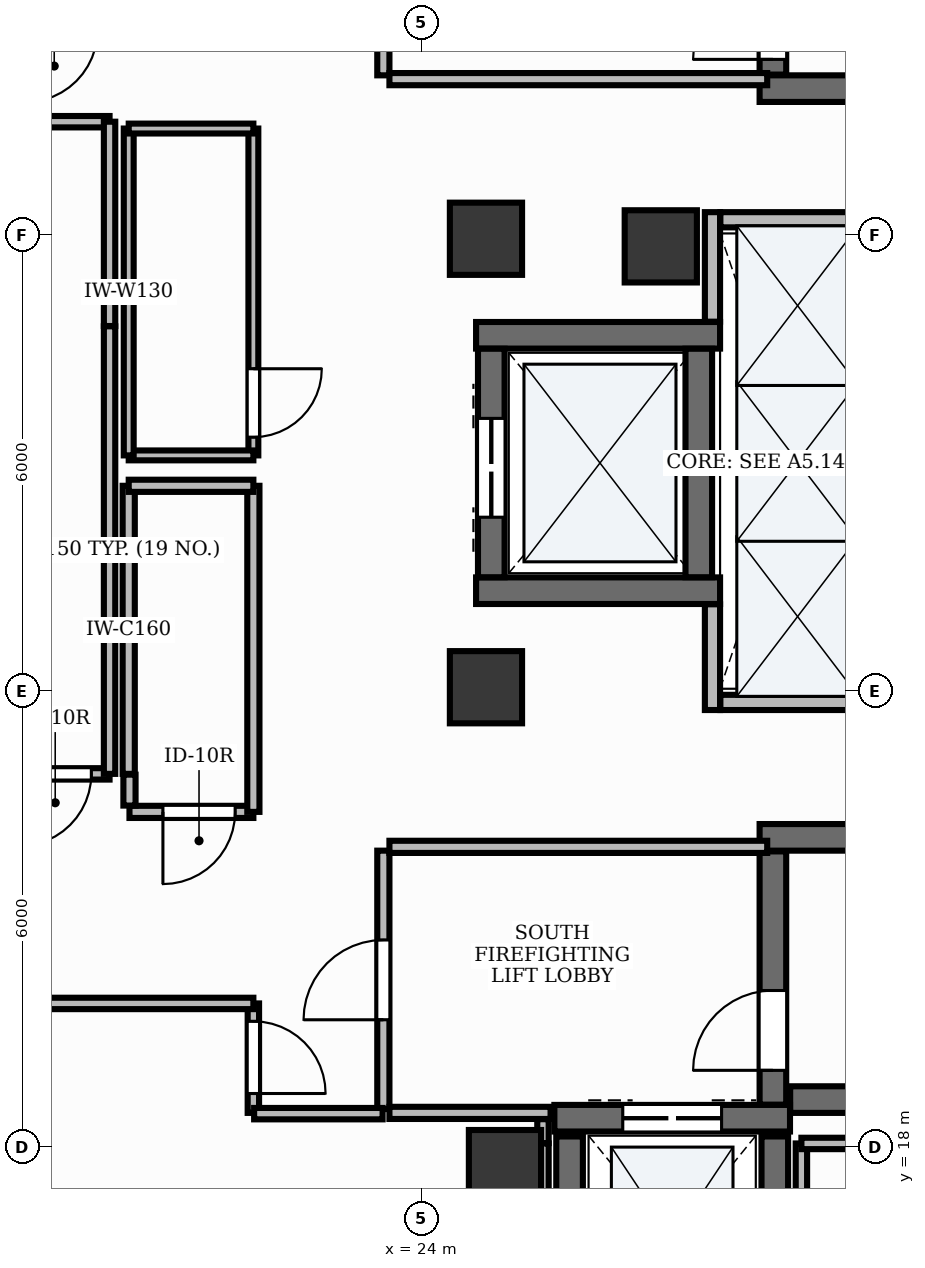
"""IFC4 building model, lengths in metres.
Left out: names, types, materials, properties, quantities, classifications, styles, units other than length and angle.
Written with IfcOpenShell. Run it as: python <this file> out.ifc"""

import sys

from ifc_helpers import new_model, si_unit, direction, frame, frame_2d, origin, origin_2d, place, context, subcontext, project, spatial, rectangle, extrude, element, fill, save


model = new_model("IFC4")
c1 = context("Model", 3, precision=1e-05, world=origin(), true_north=direction((0.0, 1.0)))
c2 = subcontext(c1, "Body", "Model", "MODEL_VIEW")
j1 = project(units=[si_unit("LENGTHUNIT", "METRE"), si_unit("PLANEANGLEUNIT", "RADIAN")], contexts=[c1])
p1 = place(None, origin())
s1 = spatial("IfcSite", under=j1, at=p1, CompositionType="ELEMENT")
p2 = place(p1, origin())
s2 = spatial("IfcBuilding", under=s1, at=p2, CompositionType="ELEMENT")
p3 = place(p2, frame((0.0, 0.0, 322.8)))
s3 = spatial("IfcBuildingStorey", under=s2, at=p3, CompositionType="ELEMENT", Elevation=322.8)
p4 = place(p3, frame((28.45, 31.925, 0.0), z_axis=(0.0, 0.0, 1.0), x_axis=(1.0, 0.0, 0.0)))
e1 = element("IfcWall", 1, at=p4, inside=s3, PredefinedType="SHEAR", context=c2, shape_type="SweptSolid", body=[
    extrude(rectangle(XDim=8.55, YDim=0.35, at=frame_2d((4.275, 0.0))), origin(), (0.0, 0.0, 1.0), 3.9),
])
p5 = place(p3, frame((28.625, 32.11, 0.0), z_axis=(0.0, 0.0, 1.0), x_axis=(0.0, 1.0, 0.0)))
e2 = element("IfcWall", 2, at=p5, inside=s3, PredefinedType="SHEAR", context=c2, shape_type="SweptSolid", body=[
    extrude(rectangle(XDim=3.333, YDim=0.35, at=frame_2d((1.667, 0.0))), origin(), (0.0, 0.0, 1.0), 3.9),
])
p6 = place(p5, frame((0.2, 0.0, 0.0)))
e3 = element("IfcOpeningElement", 3, at=p6, cuts=e2, PredefinedType="OPENING", context=c2, shape_type="SweptSolid", body=[
    extrude(rectangle(XDim=1.05, YDim=2.15, at=frame_2d((0.525, 1.075))), frame((0.0, 0.19, 0.0), z_axis=(0.0, -1.0, 0.0), x_axis=(1.0, 0.0, 0.0)), (0.0, 0.0, 1.0), 0.38),
])
p7 = place(p3, frame((28.852, 18.625, 0.0), z_axis=(0.0, 0.0, 1.0), x_axis=(1.0, 0.0, 0.0)))
e4 = element("IfcWall", 4, at=p7, inside=s3, PredefinedType="SHEAR", context=c2, shape_type="SweptSolid", body=[
    extrude(rectangle(XDim=8.148, YDim=0.35, at=frame_2d((4.074, 0.0))), origin(), (0.0, 0.0, 1.0), 3.9),
])
p8 = place(p3, frame((28.45, 22.075, 0.0), z_axis=(0.0, 0.0, 1.0), x_axis=(1.0, 0.0, 0.0)))
e5 = element("IfcWall", 5, at=p8, inside=s3, PredefinedType="SHEAR", context=c2, shape_type="SweptSolid", body=[
    extrude(rectangle(XDim=8.55, YDim=0.35, at=frame_2d((4.275, 0.0))), origin(), (0.0, 0.0, 1.0), 3.9),
])
p9 = place(p3, frame((28.625, 18.557, 0.0), z_axis=(0.0, 0.0, 1.0), x_axis=(0.0, 1.0, 0.0)))
e6 = element("IfcWall", 6, at=p9, inside=s3, PredefinedType="SHEAR", context=c2, shape_type="SweptSolid", body=[
    extrude(rectangle(XDim=3.333, YDim=0.35, at=frame_2d((1.667, 0.0))), origin(), (0.0, 0.0, 1.0), 3.9),
])
p10 = place(p9, frame((0.453, 0.0, 0.0)))
e7 = element("IfcOpeningElement", 7, at=p10, cuts=e6, PredefinedType="OPENING", context=c2, shape_type="SweptSolid", body=[
    extrude(rectangle(XDim=1.05, YDim=2.15, at=frame_2d((0.525, 1.075))), frame((0.0, 0.19, 0.0), z_axis=(0.0, -1.0, 0.0), x_axis=(1.0, 0.0, 0.0)), (0.0, 0.0, 1.0), 0.38),
])
p11 = place(p3, frame((25.75, 18.38, 0.0), z_axis=(0.0, 0.0, 1.0), x_axis=(1.0, 0.0, 0.0)))
e8 = element("IfcWall", 8, at=p11, inside=s3, PredefinedType="SHEAR", context=c2, shape_type="SweptSolid", body=[
    extrude(rectangle(XDim=3.1, YDim=0.35, at=frame_2d((1.55, 0.0))), origin(), (0.0, 0.0, 1.0), 3.9),
])
p12 = place(p11, frame((0.9, 0.0, 0.0)))
e9 = element("IfcOpeningElement", 9, at=p12, cuts=e8, PredefinedType="OPENING", context=c2, shape_type="SweptSolid", body=[
    extrude(rectangle(XDim=1.3, YDim=2.2, at=frame_2d((0.65, 1.1))), frame((0.0, 0.19, 0.0), z_axis=(0.0, -1.0, 0.0), x_axis=(1.0, 0.0, 0.0)), (0.0, 0.0, 1.0), 0.38),
])
for number, where, z_axis, x_axis in (
    (10, (25.95, 15.44, 0.0), (0.0, 0.0, 1.0), (0.0, 1.0, 0.0)),
    (11, (28.65, 15.44, 0.0), (0.0, 0.0, 1.0), (0.0, 1.0, 0.0)),
):
    element("IfcWall", number, at=place(p3, frame(where, z_axis=z_axis, x_axis=x_axis)), inside=s3, PredefinedType="SHEAR", context=c2, shape_type="SweptSolid", body=[
        extrude(rectangle(XDim=2.7, YDim=0.35, at=frame_2d((1.35, 0.0))), origin(), (0.0, 0.0, 1.0), 3.9),
    ])
for number, where, z_axis, x_axis in (
    (12, (24.72, 28.68, 0.0), (0.0, 0.0, 1.0), (1.0, 0.0, 0.0)),
    (13, (24.72, 25.32, 0.0), (0.0, 0.0, 1.0), (1.0, 0.0, 0.0)),
):
    element("IfcWall", number, at=place(p3, frame(where, z_axis=z_axis, x_axis=x_axis)), inside=s3, PredefinedType="SHEAR", context=c2, shape_type="SweptSolid", body=[
        extrude(rectangle(XDim=3.21, YDim=0.35, at=frame_2d((1.605, 0.0))), origin(), (0.0, 0.0, 1.0), 3.9),
    ])
p13 = place(p3, frame((24.92, 25.497, 0.0), z_axis=(0.0, 0.0, 1.0), x_axis=(0.0, 1.0, 0.0)))
e14 = element("IfcWall", 14, at=p13, inside=s3, PredefinedType="SHEAR", context=c2, shape_type="SweptSolid", body=[
    extrude(rectangle(XDim=3.006, YDim=0.35, at=frame_2d((1.503, 0.0))), origin(), (0.0, 0.0, 1.0), 3.9),
])
p14 = place(p13, frame((0.79, 0.0, 0.0)))
e15 = element("IfcOpeningElement", 15, at=p14, cuts=e14, PredefinedType="OPENING", context=c2, shape_type="SweptSolid", body=[
    extrude(rectangle(XDim=1.3, YDim=2.2, at=frame_2d((0.65, 1.1))), frame((0.0, 0.19, 0.0), z_axis=(0.0, -1.0, 0.0), x_axis=(1.0, 0.0, 0.0)), (0.0, 0.0, 1.0), 0.38),
])
p15 = place(p3, frame((27.65, 25.497, 0.0), z_axis=(0.0, 0.0, 1.0), x_axis=(0.0, 1.0, 0.0)))
e16 = element("IfcWall", 16, at=p15, inside=s3, PredefinedType="SHEAR", context=c2, shape_type="SweptSolid", body=[
    extrude(rectangle(XDim=3.006, YDim=0.35, at=frame_2d((1.503, 0.0))), origin(), (0.0, 0.0, 1.0), 3.9),
])
for number, where, z_axis, x_axis in (
    (17, (24.85, 29.95, -0.0), (0.0, 0.0, 1.0), (1.0, 0.0, 0.0)),
    (18, (27.15, 29.85, -0.0), (0.0, 0.0, 1.0), (1.0, 0.0, 0.0)),
    (19, (24.85, 24.05, -0.0), (0.0, 0.0, 1.0), (1.0, 0.0, 0.0)),
    (20, (25.1, 17.75, -0.0), (0.0, 0.0, 1.0), (1.0, 0.0, 0.0)),
):
    element("IfcColumn", number, at=place(p3, frame(where, z_axis=z_axis, x_axis=x_axis)), inside=s3, PredefinedType="PILASTER", context=c2, shape_type="SweptSolid", body=[
        extrude(rectangle(XDim=0.95, YDim=0.95, at=origin_2d()), origin(), (0.0, 0.0, 1.0), 3.901),
    ])
p16 = place(p3, frame((27.83, 23.75, 0.0), z_axis=(0.0, 0.0, 1.0), x_axis=(0.0, 1.0, 0.0)))
e21 = element("IfcWall", 21, at=p16, inside=s3, PredefinedType="PARTITIONING", context=c2, shape_type="SweptSolid", body=[
    extrude(rectangle(XDim=1.391, YDim=0.2, at=frame_2d((0.696, 0.0))), origin(), (0.0, 0.0, 1.0), 2.22),
])
p17 = place(p3, frame((27.83, 28.859, 0.0), z_axis=(0.0, 0.0, 1.0), x_axis=(0.0, 1.0, 0.0)))
e22 = element("IfcWall", 22, at=p17, inside=s3, PredefinedType="PARTITIONING", context=c2, shape_type="SweptSolid", body=[
    extrude(rectangle(XDim=1.441, YDim=0.2, at=frame_2d((0.721, 0.0))), origin(), (0.0, 0.0, 1.0), 2.22),
])
for number, where, z_axis, x_axis in (
    (23, (27.934, 23.85, 0.0), (0.0, 0.0, 1.0), (1.0, 0.0, 0.0)),
    (24, (27.934, 30.2, 0.0), (0.0, 0.0, 1.0), (1.0, 0.0, 0.0)),
):
    element("IfcWall", number, at=place(p3, frame(where, z_axis=z_axis, x_axis=x_axis)), inside=s3, PredefinedType="PARTITIONING", context=c2, shape_type="SweptSolid", body=[
        extrude(rectangle(XDim=2.096, YDim=0.2, at=frame_2d((1.048, 0.0))), origin(), (0.0, 0.0, 1.0), 2.22),
    ])
p18 = place(p3, frame((23.5, 32.1, 0.0), z_axis=(0.0, 0.0, 1.0), x_axis=(0.0, 1.0, 0.0)))
e25 = element("IfcWall", 25, at=p18, inside=s3, PredefinedType="PARTITIONING", context=c2, shape_type="SweptSolid", body=[
    extrude(rectangle(XDim=3.4, YDim=0.16, at=frame_2d((1.7, 0.0))), origin(), (0.0, 0.0, 1.0), 2.22),
])
p19 = place(p18, frame((1.175, 0.0, 0.0)))
e26 = element("IfcOpeningElement", 26, at=p19, cuts=e25, PredefinedType="OPENING", context=c2, shape_type="SweptSolid", body=[
    extrude(rectangle(XDim=1.05, YDim=2.15, at=frame_2d((0.525, 1.075))), frame((0.0, 0.095, 0.0), z_axis=(0.0, -1.0, 0.0), x_axis=(1.0, 0.0, 0.0)), (0.0, 0.0, 1.0), 0.19),
])
p20 = place(p3, frame((23.5, 18.5, 0.0), z_axis=(0.0, 0.0, 1.0), x_axis=(0.0, 1.0, 0.0)))
e27 = element("IfcWall", 27, at=p20, inside=s3, PredefinedType="PARTITIONING", context=c2, shape_type="SweptSolid", body=[
    extrude(rectangle(XDim=3.4, YDim=0.16, at=frame_2d((1.7, 0.0))), origin(), (0.0, 0.0, 1.0), 2.22),
])
p21 = place(p20, frame((1.175, 0.0, 0.0)))
e28 = element("IfcOpeningElement", 28, at=p21, cuts=e27, PredefinedType="OPENING", context=c2, shape_type="SweptSolid", body=[
    extrude(rectangle(XDim=1.05, YDim=2.15, at=frame_2d((0.525, 1.075))), frame((0.0, 0.095, 0.0), z_axis=(0.0, -1.0, 0.0), x_axis=(1.0, 0.0, 0.0)), (0.0, 0.0, 1.0), 0.19),
])
for number, where, z_axis, x_axis in (
    (29, (23.58, 32.05, 0.0), (0.0, 0.0, 1.0), (1.0, 0.0, 0.0)),
    (30, (23.58, 21.95, 0.0), (0.0, 0.0, 1.0), (1.0, 0.0, 0.0)),
):
    element("IfcWall", number, at=place(p3, frame(where, z_axis=z_axis, x_axis=x_axis)), inside=s3, PredefinedType="PARTITIONING", context=c2, shape_type="SweptSolid", body=[
        extrude(rectangle(XDim=4.97, YDim=0.16, at=frame_2d((2.485, 0.0))), origin(), (0.0, 0.0, 1.0), 2.22),
    ])
p22 = place(p3, frame((23.58, 18.45, 0.0), z_axis=(0.0, 0.0, 1.0), x_axis=(1.0, 0.0, 0.0)))
e31 = element("IfcWall", 31, at=p22, inside=s3, PredefinedType="PARTITIONING", context=c2, shape_type="SweptSolid", body=[
    extrude(rectangle(XDim=2.12, YDim=0.16, at=frame_2d((1.06, 0.0))), origin(), (0.0, 0.0, 1.0), 2.22),
])
p23 = place(p3, frame((21.79, 22.41, 0.0), z_axis=(0.0, 0.0, 1.0), x_axis=(-1.0, 0.0, 0.0)))
e32 = element("IfcWall", 32, at=p23, inside=s3, PredefinedType="PARTITIONING", context=c2, shape_type="SweptSolid", body=[
    extrude(rectangle(XDim=1.63, YDim=0.16, at=frame_2d((0.815, 0.0))), origin(), (0.0, 0.0, 1.0), 2.22),
])
p24 = place(p23, frame((0.24, 0.0, 0.0)))
e33 = element("IfcOpeningElement", 33, at=p24, cuts=e32, PredefinedType="OPENING", context=c2, shape_type="SweptSolid", body=[
    extrude(rectangle(XDim=0.95, YDim=2.15, at=frame_2d((0.475, 1.075))), frame((0.0, 0.095, 0.0), z_axis=(0.0, -1.0, 0.0), x_axis=(1.0, 0.0, 0.0)), (0.0, 0.0, 1.0), 0.19),
])
p25 = place(p3, frame((21.79, 31.4, 0.0), z_axis=(0.0, 0.0, 1.0), x_axis=(0.0, -1.0, 0.0)))
e34 = element("IfcWall", 34, at=p25, inside=s3, PredefinedType="PARTITIONING", context=c2, shape_type="SweptSolid", body=[
    extrude(rectangle(XDim=4.3, YDim=0.13, at=frame_2d((2.15, 0.0))), origin(), (0.0, 0.0, 1.0), 2.22),
])
p26 = place(p25, frame((3.16, 0.0, 0.0)))
e35 = element("IfcOpeningElement", 35, at=p26, cuts=e34, PredefinedType="OPENING", context=c2, shape_type="SweptSolid", body=[
    extrude(rectangle(XDim=0.9, YDim=2.15, at=frame_2d((0.45, 1.075))), frame((0.0, 0.08, 0.0), z_axis=(0.0, -1.0, 0.0), x_axis=(1.0, 0.0, 0.0)), (0.0, 0.0, 1.0), 0.16),
])
p27 = place(p3, frame((21.79, 19.89, 0.0), z_axis=(0.0, 0.0, 1.0), x_axis=(0.0, -1.0, 0.0)))
e36 = element("IfcWall", 36, at=p27, inside=s3, PredefinedType="PARTITIONING", context=c2, shape_type="SweptSolid", body=[
    extrude(rectangle(XDim=1.44, YDim=0.15, at=frame_2d((0.72, 0.0))), origin(), (0.0, 0.0, 1.0), 2.22),
])
p28 = place(p27, frame((0.235, 0.0, 0.0)))
e37 = element("IfcOpeningElement", 37, at=p28, cuts=e36, PredefinedType="OPENING", context=c2, shape_type="SweptSolid", body=[
    extrude(rectangle(XDim=0.95, YDim=2.15, at=frame_2d((0.475, 1.075))), frame((0.0, 0.09, 0.0), z_axis=(0.0, -1.0, 0.0), x_axis=(1.0, 0.0, 0.0)), (0.0, 0.0, 1.0), 0.18),
])
p29 = place(p3, frame((19.898, 22.91, 0.0), z_axis=(0.0, 0.0, 1.0), x_axis=(-1.0, 0.0, 0.0)))
e38 = element("IfcWall", 38, at=p29, inside=s3, PredefinedType="PARTITIONING", context=c2, shape_type="SweptSolid", body=[
    extrude(rectangle(XDim=1.698, YDim=0.15, at=frame_2d((0.849, 0.0))), origin(), (0.0, 0.0, 1.0), 2.22),
])
p30 = place(p29, frame((0.24, 0.0, 0.0)))
e39 = element("IfcOpeningElement", 39, at=p30, cuts=e38, PredefinedType="OPENING", context=c2, shape_type="SweptSolid", body=[
    extrude(rectangle(XDim=0.95, YDim=2.15, at=frame_2d((0.475, 1.075))), frame((0.0, 0.09, 0.0), z_axis=(0.0, -1.0, 0.0), x_axis=(1.0, 0.0, 0.0)), (0.0, 0.0, 1.0), 0.18),
])
p31 = place(p3, frame((21.79, 26.7, 0.0), z_axis=(0.0, 0.0, 1.0), x_axis=(0.0, -1.0, 0.0)))
e40 = element("IfcWall", 40, at=p31, inside=s3, PredefinedType="PARTITIONING", context=c2, shape_type="SweptSolid", body=[
    extrude(rectangle(XDim=4.29, YDim=0.16, at=frame_2d((2.145, 0.0))), origin(), (0.0, 0.0, 1.0), 2.22),
])
p32 = place(p3, frame((20.16, 22.493, 0.0), z_axis=(0.0, 0.0, 1.0), x_axis=(0.0, 1.0, 0.0)))
e41 = element("IfcWall", 41, at=p32, inside=s3, PredefinedType="PARTITIONING", context=c2, shape_type="SweptSolid", body=[
    extrude(rectangle(XDim=0.407, YDim=0.16, at=frame_2d((0.204, 0.0))), origin(), (0.0, 0.0, 1.0), 2.22),
])
p33 = place(p3, frame((20.15, 22.91, 0.0), z_axis=(0.0, 0.0, 1.0), x_axis=(0.0, 1.0, 0.0)))
e42 = element("IfcWall", 42, at=p33, inside=s3, PredefinedType="PARTITIONING", context=c2, shape_type="SweptSolid", body=[
    extrude(rectangle(XDim=3.79, YDim=0.16, at=frame_2d((1.895, 0.0))), origin(), (0.0, 0.0, 1.0), 2.22),
])
p34 = place(p3, frame((20.15, 26.7, 0.0), z_axis=(0.0, 0.0, 1.0), x_axis=(1.0, 0.0, 0.0)))
e43 = element("IfcWall", 43, at=p34, inside=s3, PredefinedType="PARTITIONING", context=c2, shape_type="SweptSolid", body=[
    extrude(rectangle(XDim=1.64, YDim=0.16, at=frame_2d((0.82, 0.0))), origin(), (0.0, 0.0, 1.0), 2.22),
])
p35 = place(p3, frame((21.79, 27.1, 0.0), z_axis=(0.0, 0.0, 1.0), x_axis=(-1.0, 0.0, 0.0)))
e44 = element("IfcWall", 44, at=p35, inside=s3, PredefinedType="PARTITIONING", context=c2, shape_type="SweptSolid", body=[
    extrude(rectangle(XDim=1.64, YDim=0.13, at=frame_2d((0.82, 0.0))), origin(), (0.0, 0.0, 1.0), 2.22),
])
p36 = place(p3, frame((20.15, 27.1, 0.0), z_axis=(0.0, 0.0, 1.0), x_axis=(0.0, 1.0, 0.0)))
e45 = element("IfcWall", 45, at=p36, inside=s3, PredefinedType="PARTITIONING", context=c2, shape_type="SweptSolid", body=[
    extrude(rectangle(XDim=4.3, YDim=0.13, at=frame_2d((2.15, 0.0))), origin(), (0.0, 0.0, 1.0), 2.22),
])
p37 = place(p3, frame((20.15, 31.4, 0.0), z_axis=(0.0, 0.0, 1.0), x_axis=(1.0, 0.0, 0.0)))
e46 = element("IfcWall", 46, at=p37, inside=s3, PredefinedType="PARTITIONING", context=c2, shape_type="SweptSolid", body=[
    extrude(rectangle(XDim=1.64, YDim=0.13, at=frame_2d((0.82, 0.0))), origin(), (0.0, 0.0, 1.0), 2.22),
])
p38 = place(p3, frame((18.8, 19.89, 0.0), z_axis=(0.0, 0.0, 1.0), x_axis=(1.0, 0.0, 0.0)))
e47 = element("IfcWall", 47, at=p38, inside=s3, PredefinedType="PARTITIONING", context=c2, shape_type="SweptSolid", body=[
    extrude(rectangle(XDim=2.99, YDim=0.15, at=frame_2d((1.495, 0.0))), origin(), (0.0, 0.0, 1.0), 2.22),
])
p39 = place(p3, frame((21.8, 18.44, 0.0), z_axis=(0.0, 0.0, 1.0), x_axis=(1.0, 0.0, 0.0)))
e48 = element("IfcWall", 48, at=p39, inside=s3, PredefinedType="PARTITIONING", context=c2, shape_type="SweptSolid", body=[
    extrude(rectangle(XDim=1.69, YDim=0.15, at=frame_2d((0.845, 0.0))), origin(), (0.0, 0.0, 1.0), 2.22),
])
p40 = place(p3, frame((25.6, 18.367, 0.0), z_axis=(0.0, 0.0, 1.0), x_axis=(0.0, -1.0, 0.0)))
e49 = element("IfcWall", 49, at=p40, inside=s3, PredefinedType="PARTITIONING", context=c2, shape_type="SweptSolid", body=[
    extrude(rectangle(XDim=0.315, YDim=0.15, at=frame_2d((0.157, 0.0))), origin(), (0.0, 0.0, 1.0), 2.22),
])
p41 = place(p3, frame((25.6, 18.048, 0.0), z_axis=(0.0, 0.0, 1.0), x_axis=(0.0, -1.0, 0.0)))
e50 = element("IfcWall", 50, at=p41, inside=s3, PredefinedType="PARTITIONING", context=c2, shape_type="SweptSolid", body=[
    extrude(rectangle(XDim=1.879, YDim=0.15, at=frame_2d((0.939, 0.0))), origin(), (0.0, 0.0, 1.0), 2.22),
])
p42 = place(p3, frame((29.0, 14.954, 0.0), z_axis=(0.0, 0.0, 1.0), x_axis=(0.0, 1.0, 0.0)))
e51 = element("IfcWall", 51, at=p42, inside=s3, PredefinedType="PARTITIONING", context=c2, shape_type="SweptSolid", body=[
    extrude(rectangle(XDim=3.094, YDim=0.15, at=frame_2d((1.547, 0.0))), origin(), (0.0, 0.0, 1.0), 2.22),
])
p43 = place(p3, frame((29.0, 18.048, 0.0), z_axis=(0.0, 0.0, 1.0), x_axis=(1.0, 0.0, 0.0)))
e52 = element("IfcWall", 52, at=p43, inside=s3, PredefinedType="PARTITIONING", context=c2, shape_type="SweptSolid", body=[
    extrude(rectangle(XDim=0.95, YDim=0.15, at=frame_2d((0.475, 0.0))), origin(), (0.0, 0.0, 1.0), 2.22),
])
p44 = place(p3, frame((18.8, 31.49, 0.0), z_axis=(0.0, 0.0, 1.0), x_axis=(1.0, 0.0, 0.0)))
e53 = element("IfcWall", 53, at=p44, inside=s3, PredefinedType="PARTITIONING", context=c2, shape_type="SweptSolid", body=[
    extrude(rectangle(XDim=1.098, YDim=0.15, at=frame_2d((0.549, 0.0))), origin(), (0.0, 0.0, 1.0), 2.22),
])
p45 = place(p3, frame((19.898, 31.49, 0.0), z_axis=(0.0, 0.0, 1.0), x_axis=(0.0, -1.0, 0.0)))
e54 = element("IfcWall", 54, at=p45, inside=s3, PredefinedType="PARTITIONING", context=c2, shape_type="SweptSolid", body=[
    extrude(rectangle(XDim=2.112, YDim=0.15, at=frame_2d((1.056, 0.0))), origin(), (0.0, 0.0, 1.0), 2.22),
])
p46 = place(p3, frame((19.898, 29.374, 0.0), z_axis=(0.0, 0.0, 1.0), x_axis=(0.0, -1.0, 0.0)))
e55 = element("IfcWall", 55, at=p46, inside=s3, PredefinedType="PARTITIONING", context=c2, shape_type="SweptSolid", body=[
    extrude(rectangle(XDim=0.572, YDim=0.15, at=frame_2d((0.286, 0.0))), origin(), (0.0, 0.0, 1.0), 2.22),
])
p47 = place(p3, frame((19.898, 28.798, 0.0), z_axis=(0.0, 0.0, 1.0), x_axis=(0.0, -1.0, 0.0)))
e56 = element("IfcWall", 56, at=p47, inside=s3, PredefinedType="PARTITIONING", context=c2, shape_type="SweptSolid", body=[
    extrude(rectangle(XDim=5.888, YDim=0.15, at=frame_2d((2.944, 0.0))), origin(), (0.0, 0.0, 1.0), 2.22),
])
p48 = place(p6, origin())
e57 = element("IfcDoor", 57, at=p48, inside=s3, OperationType="SINGLE_SWING_LEFT", PredefinedType="DOOR", context=c2, shape_type="SweptSolid", body=[
    extrude(rectangle(XDim=1.05, YDim=2.15, at=frame_2d((0.525, 1.075))), frame((0.0, 0.025, 0.0), z_axis=(0.0, -1.0, 0.0), x_axis=(1.0, 0.0, 0.0)), (0.0, 0.0, 1.0), 0.05),
])
fill(e3, e57)
p49 = place(p10, origin())
e58 = element("IfcDoor", 58, at=p49, inside=s3, OperationType="SINGLE_SWING_LEFT", PredefinedType="DOOR", context=c2, shape_type="SweptSolid", body=[
    extrude(rectangle(XDim=1.05, YDim=2.15, at=frame_2d((0.525, 1.075))), frame((0.0, 0.025, 0.0), z_axis=(0.0, -1.0, 0.0), x_axis=(1.0, 0.0, 0.0)), (0.0, 0.0, 1.0), 0.05),
])
fill(e7, e58)
p50 = place(p12, origin())
e59 = element("IfcDoor", 59, at=p50, inside=s3, OperationType="DOUBLE_DOOR_SLIDING", PredefinedType="DOOR", context=c2, shape_type="SweptSolid", body=[
    extrude(rectangle(XDim=1.3, YDim=2.2, at=frame_2d((0.65, 1.1))), frame((0.0, 0.025, 0.0), z_axis=(0.0, -1.0, 0.0), x_axis=(1.0, 0.0, 0.0)), (0.0, 0.0, 1.0), 0.05),
])
fill(e9, e59)
p51 = place(p14, origin())
e60 = element("IfcDoor", 60, at=p51, inside=s3, OperationType="DOUBLE_DOOR_SLIDING", PredefinedType="DOOR", context=c2, shape_type="SweptSolid", body=[
    extrude(rectangle(XDim=1.3, YDim=2.2, at=frame_2d((0.65, 1.1))), frame((0.0, 0.025, 0.0), z_axis=(0.0, -1.0, 0.0), x_axis=(1.0, 0.0, 0.0)), (0.0, 0.0, 1.0), 0.05),
])
fill(e15, e60)
p52 = place(p21, origin())
e61 = element("IfcDoor", 61, at=p52, inside=s3, OperationType="SINGLE_SWING_LEFT", PredefinedType="DOOR", context=c2, shape_type="SweptSolid", body=[
    extrude(rectangle(XDim=1.05, YDim=2.15, at=frame_2d((0.525, 1.075))), frame((0.0, 0.025, 0.0), z_axis=(0.0, -1.0, 0.0), x_axis=(1.0, 0.0, 0.0)), (0.0, 0.0, 1.0), 0.05),
])
fill(e28, e61)
p53 = place(p24, origin())
e62 = element("IfcDoor", 62, at=p53, inside=s3, OperationType="SINGLE_SWING_RIGHT", PredefinedType="DOOR", context=c2, shape_type="SweptSolid", body=[
    extrude(rectangle(XDim=0.95, YDim=2.15, at=frame_2d((0.475, 1.075))), frame((0.0, 0.025, 0.0), z_axis=(0.0, -1.0, 0.0), x_axis=(1.0, 0.0, 0.0)), (0.0, 0.0, 1.0), 0.05),
])
fill(e33, e62)
p54 = place(p26, origin())
e63 = element("IfcDoor", 63, at=p54, inside=s3, OperationType="SINGLE_SWING_LEFT", PredefinedType="DOOR", context=c2, shape_type="SweptSolid", body=[
    extrude(rectangle(XDim=0.9, YDim=2.15, at=frame_2d((0.45, 1.075))), frame((0.0, 0.025, 0.0), z_axis=(0.0, -1.0, 0.0), x_axis=(1.0, 0.0, 0.0)), (0.0, 0.0, 1.0), 0.05),
])
fill(e35, e63)
p55 = place(p28, origin())
e64 = element("IfcDoor", 64, at=p55, inside=s3, OperationType="SINGLE_SWING_RIGHT", PredefinedType="DOOR", context=c2, shape_type="SweptSolid", body=[
    extrude(rectangle(XDim=0.95, YDim=2.15, at=frame_2d((0.475, 1.075))), frame((0.0, 0.025, 0.0), z_axis=(0.0, -1.0, 0.0), x_axis=(1.0, 0.0, 0.0)), (0.0, 0.0, 1.0), 0.05),
])
fill(e37, e64)
p56 = place(p30, origin())
e65 = element("IfcDoor", 65, at=p56, inside=s3, OperationType="SINGLE_SWING_RIGHT", PredefinedType="DOOR", context=c2, shape_type="SweptSolid", body=[
    extrude(rectangle(XDim=0.95, YDim=2.15, at=frame_2d((0.475, 1.075))), frame((0.0, 0.025, 0.0), z_axis=(0.0, -1.0, 0.0), x_axis=(1.0, 0.0, 0.0)), (0.0, 0.0, 1.0), 0.05),
])
fill(e39, e65)
save(model, sys.argv[1])
